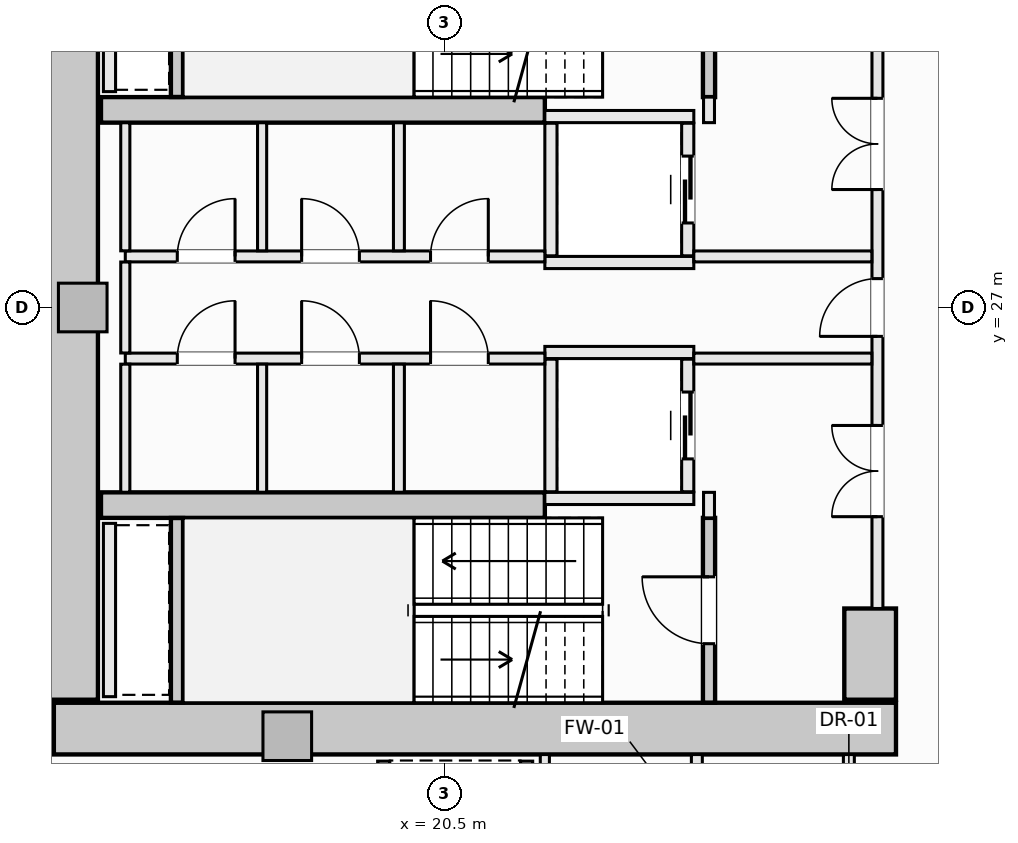
"""IFC4 building model, lengths in metres.
Left out: names, types, materials, properties, quantities, classifications, styles, units other than length and angle.
Written with IfcOpenShell. Run it as: python <this file> out.ifc"""

import sys

from ifc_helpers import new_model, si_unit, direction, frame, frame_2d, origin, origin_2d, place, context, subcontext, project, spatial, rectangle, extrude, element, fill, save


model = new_model("IFC4")
c1 = context("Model", 3, precision=1e-05, world=origin(), true_north=direction((0.0, 1.0)))
c2 = subcontext(c1, "Body", "Model", "MODEL_VIEW")
j1 = project(units=[si_unit("LENGTHUNIT", "METRE"), si_unit("PLANEANGLEUNIT", "RADIAN")], contexts=[c1])
p1 = place(None, origin())
s1 = spatial("IfcSite", under=j1, at=p1, CompositionType="ELEMENT")
p2 = place(p1, origin())
s2 = spatial("IfcBuilding", under=s1, at=p2, CompositionType="ELEMENT")
p3 = place(p2, frame((0.0, 0.0, 53.45)))
s3 = spatial("IfcBuildingStorey", under=s2, at=p3, CompositionType="ELEMENT", Elevation=53.45)
p4 = place(p3, frame((14.075, 20.075, -0.28), z_axis=(0.0, 0.0, 1.0), x_axis=(1.0, 0.0, 0.0)))
e1 = element("IfcWall", 1, at=p4, inside=s3, PredefinedType="SHEAR", context=c2, shape_type="SweptSolid", body=[
    extrude(rectangle(XDim=13.85, YDim=0.85, at=frame_2d((6.925, 0.0))), origin(), (0.0, 0.0, 1.0), 3.85),
])
p5 = place(p3, frame((14.375, 20.55, -0.28), z_axis=(0.0, 0.0, 1.0), x_axis=(0.0, 1.0, 0.0)))
e2 = element("IfcWall", 2, at=p5, inside=s3, PredefinedType="SHEAR", context=c2, shape_type="SweptSolid", body=[
    extrude(rectangle(XDim=12.9, YDim=0.85, at=frame_2d((6.45, 0.0))), origin(), (0.0, 0.0, 1.0), 3.85),
])
p6 = place(p3, frame((27.5, 20.55, -0.28), z_axis=(0.0, 0.0, 1.0), x_axis=(0.0, 1.0, 0.0)))
e3 = element("IfcWall", 3, at=p6, inside=s3, PredefinedType="SHEAR", context=c2, shape_type="SweptSolid", body=[
    extrude(rectangle(XDim=1.5, YDim=0.85, at=frame_2d((0.75, 0.0))), origin(), (0.0, 0.0, 1.0), 3.85),
])
for number, where, z_axis, x_axis in (
    (4, (14.85, 30.25, -0.28), (0.0, 0.0, 1.0), (1.0, 0.0, 0.0)),
    (5, (14.85, 23.75, -0.28), (0.0, 0.0, 1.0), (1.0, 0.0, 0.0)),
):
    element("IfcWall", number, at=place(p3, frame(where, z_axis=z_axis, x_axis=x_axis)), inside=s3, PredefinedType="SHEAR", context=c2, shape_type="SweptSolid", body=[
        extrude(rectangle(XDim=7.3, YDim=0.42, at=frame_2d((3.65, 0.0))), origin(), (0.0, 0.0, 1.0), 3.85),
    ])
for number, where, z_axis, x_axis in (
    (6, (14.55, 27.0, -0.28), (0.0, 0.0, 1.0), (1.0, 0.0, 0.0)),
    (7, (17.914, 19.95, -0.28), (0.0, 0.0, 1.0), (1.0, 0.0, 0.0)),
):
    element("IfcColumn", number, at=place(p3, frame(where, z_axis=z_axis, x_axis=x_axis)), inside=s3, PredefinedType="PILASTER", context=c2, shape_type="SweptSolid", body=[
        extrude(rectangle(XDim=0.8, YDim=0.8, at=origin_2d()), origin(), (0.0, 0.0, 1.0), 3.85),
    ])
p7 = place(p3, frame((24.85, 30.46, -0.28), z_axis=(0.0, 0.0, 1.0), x_axis=(0.0, 1.0, 0.0)))
e8 = element("IfcWall", 8, at=p7, inside=s3, PredefinedType="SHEAR", context=c2, shape_type="SweptSolid", body=[
    extrude(rectangle(XDim=3.038, YDim=0.2, at=frame_2d((1.519, 0.0))), origin(), (0.0, 0.0, 1.0), 3.85),
])
p8 = place(p7, frame((0.969, 0.0, 0.28)))
e9 = element("IfcOpeningElement", 9, at=p8, cuts=e8, PredefinedType="OPENING", context=c2, shape_type="SweptSolid", body=[
    extrude(rectangle(XDim=1.1, YDim=2.15, at=frame_2d((0.55, 1.075))), frame((0.0, 0.11, 0.0), z_axis=(0.0, -1.0, 0.0), x_axis=(1.0, 0.0, 0.0)), (0.0, 0.0, 1.0), 0.22),
])
p9 = place(p3, frame((16.1, 30.462, -0.28), z_axis=(0.0, 0.0, 1.0), x_axis=(0.0, 1.0, 0.0)))
e10 = element("IfcWall", 10, at=p9, inside=s3, PredefinedType="SHEAR", context=c2, shape_type="SweptSolid", body=[
    extrude(rectangle(XDim=3.036, YDim=0.2, at=frame_2d((1.518, 0.0))), origin(), (0.0, 0.0, 1.0), 3.85),
])
p10 = place(p3, frame((24.85, 20.502, -0.28), z_axis=(0.0, 0.0, 1.0), x_axis=(0.0, 1.0, 0.0)))
e11 = element("IfcWall", 11, at=p10, inside=s3, PredefinedType="SHEAR", context=c2, shape_type="SweptSolid", body=[
    extrude(rectangle(XDim=3.038, YDim=0.2, at=frame_2d((1.519, 0.0))), origin(), (0.0, 0.0, 1.0), 3.85),
])
p11 = place(p10, frame((0.969, 0.0, 0.28)))
e12 = element("IfcOpeningElement", 12, at=p11, cuts=e11, PredefinedType="OPENING", context=c2, shape_type="SweptSolid", body=[
    extrude(rectangle(XDim=1.1, YDim=2.15, at=frame_2d((0.55, 1.075))), frame((0.0, 0.11, 0.0), z_axis=(0.0, -1.0, 0.0), x_axis=(1.0, 0.0, 0.0)), (0.0, 0.0, 1.0), 0.22),
])
p12 = place(p3, frame((16.1, 20.502, -0.28), z_axis=(0.0, 0.0, 1.0), x_axis=(0.0, 1.0, 0.0)))
e13 = element("IfcWall", 13, at=p12, inside=s3, PredefinedType="SHEAR", context=c2, shape_type="SweptSolid", body=[
    extrude(rectangle(XDim=3.036, YDim=0.2, at=frame_2d((1.518, 0.0))), origin(), (0.0, 0.0, 1.0), 3.85),
])
for number, where, z_axis, x_axis in (
    (14, (22.15, 30.14, 0.0), (0.0, 0.0, 1.0), (1.0, 0.0, 0.0)),
    (15, (22.15, 27.74, 0.0), (0.0, 0.0, 1.0), (1.0, 0.0, 0.0)),
):
    element("IfcWall", number, at=place(p3, frame(where, z_axis=z_axis, x_axis=x_axis)), inside=s3, PredefinedType="SOLIDWALL", context=c2, shape_type="SweptSolid", body=[
        extrude(rectangle(XDim=2.45, YDim=0.2, at=frame_2d((1.225, 0.0))), origin(), (0.0, 0.0, 1.0), 3.57),
    ])
p13 = place(p3, frame((22.25, 27.85, 0.0), z_axis=(0.0, 0.0, 1.0), x_axis=(0.0, 1.0, 0.0)))
e16 = element("IfcWall", 16, at=p13, inside=s3, PredefinedType="SOLIDWALL", context=c2, shape_type="SweptSolid", body=[
    extrude(rectangle(XDim=2.18, YDim=0.2, at=frame_2d((1.09, 0.0))), origin(), (0.0, 0.0, 1.0), 3.57),
])
p14 = place(p3, frame((24.5, 27.85, 0.0), z_axis=(0.0, 0.0, 1.0), x_axis=(0.0, 1.0, 0.0)))
e17 = element("IfcWall", 17, at=p14, inside=s3, PredefinedType="SOLIDWALL", context=c2, shape_type="SweptSolid", body=[
    extrude(rectangle(XDim=2.18, YDim=0.2, at=frame_2d((1.09, 0.0))), origin(), (0.0, 0.0, 1.0), 3.57),
])
p15 = place(p14, frame((0.54, 0.0, 0.0)))
e18 = element("IfcOpeningElement", 18, at=p15, cuts=e17, PredefinedType="OPENING", context=c2, shape_type="SweptSolid", body=[
    extrude(rectangle(XDim=1.1, YDim=2.2, at=frame_2d((0.55, 1.1))), frame((0.0, 0.11, 0.0), z_axis=(0.0, -1.0, 0.0), x_axis=(1.0, 0.0, 0.0)), (0.0, 0.0, 1.0), 0.22),
])
for number, where, z_axis, x_axis in (
    (19, (22.15, 26.26, 0.0), (0.0, 0.0, 1.0), (1.0, 0.0, 0.0)),
    (20, (22.15, 23.86, 0.0), (0.0, 0.0, 1.0), (1.0, 0.0, 0.0)),
):
    element("IfcWall", number, at=place(p3, frame(where, z_axis=z_axis, x_axis=x_axis)), inside=s3, PredefinedType="SOLIDWALL", context=c2, shape_type="SweptSolid", body=[
        extrude(rectangle(XDim=2.45, YDim=0.2, at=frame_2d((1.225, 0.0))), origin(), (0.0, 0.0, 1.0), 3.57),
    ])
p16 = place(p3, frame((22.25, 23.97, 0.0), z_axis=(0.0, 0.0, 1.0), x_axis=(0.0, 1.0, 0.0)))
e21 = element("IfcWall", 21, at=p16, inside=s3, PredefinedType="SOLIDWALL", context=c2, shape_type="SweptSolid", body=[
    extrude(rectangle(XDim=2.18, YDim=0.2, at=frame_2d((1.09, 0.0))), origin(), (0.0, 0.0, 1.0), 3.57),
])
p17 = place(p3, frame((24.5, 23.97, 0.0), z_axis=(0.0, 0.0, 1.0), x_axis=(0.0, 1.0, 0.0)))
e22 = element("IfcWall", 22, at=p17, inside=s3, PredefinedType="SOLIDWALL", context=c2, shape_type="SweptSolid", body=[
    extrude(rectangle(XDim=2.18, YDim=0.2, at=frame_2d((1.09, 0.0))), origin(), (0.0, 0.0, 1.0), 3.57),
])
p18 = place(p17, frame((0.54, 0.0, 0.0)))
e23 = element("IfcOpeningElement", 23, at=p18, cuts=e22, PredefinedType="OPENING", context=c2, shape_type="SweptSolid", body=[
    extrude(rectangle(XDim=1.1, YDim=2.2, at=frame_2d((0.55, 1.1))), frame((0.0, 0.11, 0.0), z_axis=(0.0, -1.0, 0.0), x_axis=(1.0, 0.0, 0.0)), (0.0, 0.0, 1.0), 0.22),
])
for number, where, z_axis, x_axis in (
    (24, (19.5, 17.01, 0.0), (0.0, 0.0, 1.0), (0.0, 1.0, 0.0)),
    (25, (21.85, 17.01, 0.0), (0.0, 0.0, 1.0), (0.0, 1.0, 0.0)),
):
    element("IfcWall", number, at=place(p3, frame(where, z_axis=z_axis, x_axis=x_axis)), inside=s3, PredefinedType="SOLIDWALL", context=c2, shape_type="SweptSolid", body=[
        extrude(rectangle(XDim=2.53, YDim=0.2, at=frame_2d((1.265, 0.0))), origin(), (0.0, 0.0, 1.0), 3.57),
    ])
for number, where, z_axis, x_axis in (
    (26, (14.99, 30.55, 0.0), (0.0, 0.0, 1.0), (0.0, 1.0, 0.0)),
    (27, (14.99, 20.6, 0.0), (0.0, 0.0, 1.0), (0.0, 1.0, 0.0)),
):
    element("IfcWall", number, at=place(p3, frame(where, z_axis=z_axis, x_axis=x_axis)), inside=s3, PredefinedType="SOLIDWALL", context=c2, shape_type="SweptSolid", body=[
        extrude(rectangle(XDim=2.85, YDim=0.2, at=frame_2d((1.425, 0.0))), origin(), (0.0, 0.0, 1.0), 3.57),
    ])
for number, where, z_axis, x_axis in (
    (28, (24.85, 23.54, 0.0), (0.0, 0.0, 1.0), (0.0, 1.0, 0.0)),
    (29, (24.85, 30.04, 0.0), (0.0, 0.0, 1.0), (0.0, 1.0, 0.0)),
):
    element("IfcWall", number, at=place(p3, frame(where, z_axis=z_axis, x_axis=x_axis)), inside=s3, PredefinedType="SOLIDWALL", context=c2, shape_type="SweptSolid", body=[
        extrude(rectangle(XDim=0.42, YDim=0.18, at=frame_2d((0.21, 0.0))), origin(), (0.0, 0.0, 1.0), 3.57),
    ])
p19 = place(p3, frame((27.62, 22.05, 0.0), z_axis=(0.0, 0.0, 1.0), x_axis=(0.0, 1.0, 0.0)))
e30 = element("IfcWall", 30, at=p19, inside=s3, PredefinedType="SOLIDWALL", context=c2, shape_type="SweptSolid", body=[
    extrude(rectangle(XDim=9.9, YDim=0.18, at=frame_2d((4.95, 0.0))), origin(), (0.0, 0.0, 1.0), 2.662),
])
p20 = place(p19, frame((4.475, 0.0, 0.0)))
e31 = element("IfcOpeningElement", 31, at=p20, cuts=e30, PredefinedType="OPENING", context=c2, shape_type="SweptSolid", body=[
    extrude(rectangle(XDim=0.95, YDim=2.1, at=frame_2d((0.475, 1.05))), frame((0.0, 0.1, 0.0), z_axis=(0.0, -1.0, 0.0), x_axis=(1.0, 0.0, 0.0)), (0.0, 0.0, 1.0), 0.2),
])
p21 = place(p19, frame((6.89, 0.0, 0.0)))
e32 = element("IfcOpeningElement", 32, at=p21, cuts=e30, PredefinedType="OPENING", context=c2, shape_type="SweptSolid", body=[
    extrude(rectangle(XDim=1.5, YDim=2.2, at=frame_2d((0.75, 1.1))), frame((0.0, 0.1, 0.0), z_axis=(0.0, -1.0, 0.0), x_axis=(1.0, 0.0, 0.0)), (0.0, 0.0, 1.0), 0.2),
])
p22 = place(p19, frame((1.51, 0.0, 0.0)))
e33 = element("IfcOpeningElement", 33, at=p22, cuts=e30, PredefinedType="OPENING", context=c2, shape_type="SweptSolid", body=[
    extrude(rectangle(XDim=1.5, YDim=2.2, at=frame_2d((0.75, 1.1))), frame((0.0, 0.1, 0.0), z_axis=(0.0, -1.0, 0.0), x_axis=(1.0, 0.0, 0.0)), (0.0, 0.0, 1.0), 0.2),
])
p23 = place(p3, frame((15.25, 27.84, 0.0), z_axis=(0.0, 0.0, 1.0), x_axis=(1.0, 0.0, 0.0)))
e34 = element("IfcWall", 34, at=p23, inside=s3, PredefinedType="SOLIDWALL", context=c2, shape_type="SweptSolid", body=[
    extrude(rectangle(XDim=6.9, YDim=0.18, at=frame_2d((3.45, 0.0))), origin(), (0.0, 0.0, 1.0), 3.57),
])
p24 = place(p23, frame((5.02, 0.0, 0.0)))
e35 = element("IfcOpeningElement", 35, at=p24, cuts=e34, PredefinedType="OPENING", context=c2, shape_type="SweptSolid", body=[
    extrude(rectangle(XDim=0.95, YDim=2.1, at=frame_2d((0.475, 1.05))), frame((0.0, 0.1, 0.0), z_axis=(0.0, -1.0, 0.0), x_axis=(1.0, 0.0, 0.0)), (0.0, 0.0, 1.0), 0.2),
])
p25 = place(p23, frame((0.855, 0.0, 0.0)))
e36 = element("IfcOpeningElement", 36, at=p25, cuts=e34, PredefinedType="OPENING", context=c2, shape_type="SweptSolid", body=[
    extrude(rectangle(XDim=0.95, YDim=2.1, at=frame_2d((0.475, 1.05))), frame((0.0, 0.1, 0.0), z_axis=(0.0, -1.0, 0.0), x_axis=(1.0, 0.0, 0.0)), (0.0, 0.0, 1.0), 0.2),
])
p26 = place(p23, frame((2.9, 0.0, 0.0)))
e37 = element("IfcOpeningElement", 37, at=p26, cuts=e34, PredefinedType="OPENING", context=c2, shape_type="SweptSolid", body=[
    extrude(rectangle(XDim=0.95, YDim=2.1, at=frame_2d((0.475, 1.05))), frame((0.0, 0.1, 0.0), z_axis=(0.0, -1.0, 0.0), x_axis=(1.0, 0.0, 0.0)), (0.0, 0.0, 1.0), 0.2),
])
p27 = place(p3, frame((24.6, 27.84, 0.0), z_axis=(0.0, 0.0, 1.0), x_axis=(1.0, 0.0, 0.0)))
e38 = element("IfcWall", 38, at=p27, inside=s3, PredefinedType="SOLIDWALL", context=c2, shape_type="SweptSolid", body=[
    extrude(rectangle(XDim=2.928, YDim=0.18, at=frame_2d((1.464, 0.0))), origin(), (0.0, 0.0, 1.0), 3.57),
])
p28 = place(p3, frame((15.25, 26.16, 0.0), z_axis=(0.0, 0.0, 1.0), x_axis=(1.0, 0.0, 0.0)))
e39 = element("IfcWall", 39, at=p28, inside=s3, PredefinedType="SOLIDWALL", context=c2, shape_type="SweptSolid", body=[
    extrude(rectangle(XDim=6.9, YDim=0.18, at=frame_2d((3.45, 0.0))), origin(), (0.0, 0.0, 1.0), 3.57),
])
p29 = place(p28, frame((5.02, 0.0, 0.0)))
e40 = element("IfcOpeningElement", 40, at=p29, cuts=e39, PredefinedType="OPENING", context=c2, shape_type="SweptSolid", body=[
    extrude(rectangle(XDim=0.95, YDim=2.1, at=frame_2d((0.475, 1.05))), frame((0.0, 0.1, 0.0), z_axis=(0.0, -1.0, 0.0), x_axis=(1.0, 0.0, 0.0)), (0.0, 0.0, 1.0), 0.2),
])
p30 = place(p28, frame((0.855, 0.0, 0.0)))
e41 = element("IfcOpeningElement", 41, at=p30, cuts=e39, PredefinedType="OPENING", context=c2, shape_type="SweptSolid", body=[
    extrude(rectangle(XDim=0.95, YDim=2.1, at=frame_2d((0.475, 1.05))), frame((0.0, 0.1, 0.0), z_axis=(0.0, -1.0, 0.0), x_axis=(1.0, 0.0, 0.0)), (0.0, 0.0, 1.0), 0.2),
])
p31 = place(p28, frame((2.9, 0.0, 0.0)))
e42 = element("IfcOpeningElement", 42, at=p31, cuts=e39, PredefinedType="OPENING", context=c2, shape_type="SweptSolid", body=[
    extrude(rectangle(XDim=0.95, YDim=2.1, at=frame_2d((0.475, 1.05))), frame((0.0, 0.1, 0.0), z_axis=(0.0, -1.0, 0.0), x_axis=(1.0, 0.0, 0.0)), (0.0, 0.0, 1.0), 0.2),
])
p32 = place(p3, frame((24.6, 26.16, 0.0), z_axis=(0.0, 0.0, 1.0), x_axis=(1.0, 0.0, 0.0)))
e43 = element("IfcWall", 43, at=p32, inside=s3, PredefinedType="SOLIDWALL", context=c2, shape_type="SweptSolid", body=[
    extrude(rectangle(XDim=2.928, YDim=0.18, at=frame_2d((1.464, 0.0))), origin(), (0.0, 0.0, 1.0), 3.57),
])
p33 = place(p3, frame((15.25, 23.962, 0.0), z_axis=(0.0, 0.0, 1.0), x_axis=(0.0, 1.0, 0.0)))
e44 = element("IfcWall", 44, at=p33, inside=s3, PredefinedType="PARTITIONING", context=c2, shape_type="SweptSolid", body=[
    extrude(rectangle(XDim=2.106, YDim=0.15, at=frame_2d((1.053, 0.0))), origin(), (0.0, 0.0, 1.0), 3.57),
])
p34 = place(p3, frame((15.25, 26.252, 0.0), z_axis=(0.0, 0.0, 1.0), x_axis=(0.0, 1.0, 0.0)))
e45 = element("IfcWall", 45, at=p34, inside=s3, PredefinedType="PARTITIONING", context=c2, shape_type="SweptSolid", body=[
    extrude(rectangle(XDim=1.496, YDim=0.15, at=frame_2d((0.748, 0.0))), origin(), (0.0, 0.0, 1.0), 3.57),
])
p35 = place(p3, frame((15.25, 27.932, 0.0), z_axis=(0.0, 0.0, 1.0), x_axis=(0.0, 1.0, 0.0)))
e46 = element("IfcWall", 46, at=p35, inside=s3, PredefinedType="PARTITIONING", context=c2, shape_type="SweptSolid", body=[
    extrude(rectangle(XDim=2.106, YDim=0.15, at=frame_2d((1.053, 0.0))), origin(), (0.0, 0.0, 1.0), 3.57),
])
for number, where, z_axis, x_axis in (
    (47, (19.75, 23.962, 0.0), (0.0, 0.0, 1.0), (0.0, 1.0, 0.0)),
    (48, (19.75, 27.932, 0.0), (0.0, 0.0, 1.0), (0.0, 1.0, 0.0)),
):
    element("IfcWall", number, at=place(p3, frame(where, z_axis=z_axis, x_axis=x_axis)), inside=s3, PredefinedType="SOLIDWALL", context=c2, shape_type="SweptSolid", body=[
        extrude(rectangle(XDim=2.106, YDim=0.18, at=frame_2d((1.053, 0.0))), origin(), (0.0, 0.0, 1.0), 3.57),
    ])
for number, where, z_axis, x_axis in (
    (49, (17.5, 23.962, 0.0), (0.0, 0.0, 1.0), (0.0, 1.0, 0.0)),
    (50, (17.5, 27.932, 0.0), (0.0, 0.0, 1.0), (0.0, 1.0, 0.0)),
):
    element("IfcWall", number, at=place(p3, frame(where, z_axis=z_axis, x_axis=x_axis)), inside=s3, PredefinedType="PARTITIONING", context=c2, shape_type="SweptSolid", body=[
        extrude(rectangle(XDim=2.106, YDim=0.15, at=frame_2d((1.053, 0.0))), origin(), (0.0, 0.0, 1.0), 3.57),
    ])
p36 = place(p3, frame((22.15, 17.142, 0.0), z_axis=(0.0, 0.0, 1.0), x_axis=(0.0, 1.0, 0.0)))
e51 = element("IfcWall", 51, at=p36, inside=s3, PredefinedType="PARTITIONING", context=c2, shape_type="SweptSolid", body=[
    extrude(rectangle(XDim=2.506, YDim=0.15, at=frame_2d((1.253, 0.0))), origin(), (0.0, 0.0, 1.0), 3.57),
])
p37 = place(p3, frame((24.65, 17.142, 0.0), z_axis=(0.0, 0.0, 1.0), x_axis=(0.0, 1.0, 0.0)))
e52 = element("IfcWall", 52, at=p37, inside=s3, PredefinedType="SOLIDWALL", context=c2, shape_type="SweptSolid", body=[
    extrude(rectangle(XDim=2.506, YDim=0.18, at=frame_2d((1.253, 0.0))), origin(), (0.0, 0.0, 1.0), 3.57),
])
p38 = place(p37, frame((0.778, 0.0, 0.0)))
e53 = element("IfcOpeningElement", 53, at=p38, cuts=e52, PredefinedType="OPENING", context=c2, shape_type="SweptSolid", body=[
    extrude(rectangle(XDim=0.95, YDim=2.1, at=frame_2d((0.475, 1.05))), frame((0.0, 0.1, 0.0), z_axis=(0.0, -1.0, 0.0), x_axis=(1.0, 0.0, 0.0)), (0.0, 0.0, 1.0), 0.2),
])
p39 = place(p3, frame((27.15, 17.142, 0.0), z_axis=(0.0, 0.0, 1.0), x_axis=(0.0, 1.0, 0.0)))
e54 = element("IfcWall", 54, at=p39, inside=s3, PredefinedType="SOLIDWALL", context=c2, shape_type="SweptSolid", body=[
    extrude(rectangle(XDim=2.506, YDim=0.18, at=frame_2d((1.253, 0.0))), origin(), (0.0, 0.0, 1.0), 3.57),
])
p40 = place(p39, frame((0.778, 0.0, 0.0)))
e55 = element("IfcOpeningElement", 55, at=p40, cuts=e54, PredefinedType="OPENING", context=c2, shape_type="SweptSolid", body=[
    extrude(rectangle(XDim=0.95, YDim=2.1, at=frame_2d((0.475, 1.05))), frame((0.0, 0.1, 0.0), z_axis=(0.0, -1.0, 0.0), x_axis=(1.0, 0.0, 0.0)), (0.0, 0.0, 1.0), 0.2),
])
p41 = place(p11, origin())
e56 = element("IfcDoor", 56, at=p41, inside=s3, OperationType="SINGLE_SWING_RIGHT", PredefinedType="DOOR", context=c2, shape_type="SweptSolid", body=[
    extrude(rectangle(XDim=1.1, YDim=2.15, at=frame_2d((0.55, 1.075))), frame((0.0, 0.025, 0.0), z_axis=(0.0, -1.0, 0.0), x_axis=(1.0, 0.0, 0.0)), (0.0, 0.0, 1.0), 0.05),
])
fill(e12, e56)
p42 = place(p15, origin())
e57 = element("IfcDoor", 57, at=p42, inside=s3, OperationType="SLIDING_TO_LEFT", PredefinedType="DOOR", context=c2, shape_type="SweptSolid", body=[
    extrude(rectangle(XDim=1.1, YDim=2.2, at=frame_2d((0.55, 1.1))), frame((0.0, 0.025, 0.0), z_axis=(0.0, -1.0, 0.0), x_axis=(1.0, 0.0, 0.0)), (0.0, 0.0, 1.0), 0.05),
])
fill(e18, e57)
p43 = place(p18, origin())
e58 = element("IfcDoor", 58, at=p43, inside=s3, OperationType="SLIDING_TO_LEFT", PredefinedType="DOOR", context=c2, shape_type="SweptSolid", body=[
    extrude(rectangle(XDim=1.1, YDim=2.2, at=frame_2d((0.55, 1.1))), frame((0.0, 0.025, 0.0), z_axis=(0.0, -1.0, 0.0), x_axis=(1.0, 0.0, 0.0)), (0.0, 0.0, 1.0), 0.05),
])
fill(e23, e58)
p44 = place(p20, origin())
e59 = element("IfcDoor", 59, at=p44, inside=s3, OperationType="SINGLE_SWING_LEFT", PredefinedType="DOOR", context=c2, shape_type="SweptSolid", body=[
    extrude(rectangle(XDim=0.95, YDim=2.1, at=frame_2d((0.475, 1.05))), frame((0.0, 0.025, 0.0), z_axis=(0.0, -1.0, 0.0), x_axis=(1.0, 0.0, 0.0)), (0.0, 0.0, 1.0), 0.05),
])
fill(e31, e59)
p45 = place(p21, origin())
e60 = element("IfcDoor", 60, at=p45, inside=s3, OperationType="DOUBLE_DOOR_SINGLE_SWING", PredefinedType="DOOR", context=c2, shape_type="SweptSolid", body=[
    extrude(rectangle(XDim=1.5, YDim=2.2, at=frame_2d((0.75, 1.1))), frame((0.0, 0.025, 0.0), z_axis=(0.0, -1.0, 0.0), x_axis=(1.0, 0.0, 0.0)), (0.0, 0.0, 1.0), 0.05),
])
fill(e32, e60)
p46 = place(p22, origin())
e61 = element("IfcDoor", 61, at=p46, inside=s3, OperationType="DOUBLE_DOOR_SINGLE_SWING", PredefinedType="DOOR", context=c2, shape_type="SweptSolid", body=[
    extrude(rectangle(XDim=1.5, YDim=2.2, at=frame_2d((0.75, 1.1))), frame((0.0, 0.025, 0.0), z_axis=(0.0, -1.0, 0.0), x_axis=(1.0, 0.0, 0.0)), (0.0, 0.0, 1.0), 0.05),
])
fill(e33, e61)
p47 = place(p24, origin())
e62 = element("IfcDoor", 62, at=p47, inside=s3, OperationType="SINGLE_SWING_RIGHT", PredefinedType="DOOR", context=c2, shape_type="SweptSolid", body=[
    extrude(rectangle(XDim=0.95, YDim=2.1, at=frame_2d((0.475, 1.05))), frame((0.0, 0.025, 0.0), z_axis=(0.0, -1.0, 0.0), x_axis=(1.0, 0.0, 0.0)), (0.0, 0.0, 1.0), 0.05),
])
fill(e35, e62)
p48 = place(p29, origin())
e63 = element("IfcDoor", 63, at=p48, inside=s3, OperationType="SINGLE_SWING_LEFT", PredefinedType="DOOR", context=c2, shape_type="SweptSolid", body=[
    extrude(rectangle(XDim=0.95, YDim=2.1, at=frame_2d((0.475, 1.05))), frame((0.0, 0.025, 0.0), z_axis=(0.0, -1.0, 0.0), x_axis=(1.0, 0.0, 0.0)), (0.0, 0.0, 1.0), 0.05),
])
fill(e40, e63)
p49 = place(p25, origin())
e64 = element("IfcDoor", 64, at=p49, inside=s3, OperationType="SINGLE_SWING_RIGHT", PredefinedType="DOOR", context=c2, shape_type="SweptSolid", body=[
    extrude(rectangle(XDim=0.95, YDim=2.1, at=frame_2d((0.475, 1.05))), frame((0.0, 0.025, 0.0), z_axis=(0.0, -1.0, 0.0), x_axis=(1.0, 0.0, 0.0)), (0.0, 0.0, 1.0), 0.05),
])
fill(e36, e64)
p50 = place(p26, origin())
e65 = element("IfcDoor", 65, at=p50, inside=s3, OperationType="SINGLE_SWING_LEFT", PredefinedType="DOOR", context=c2, shape_type="SweptSolid", body=[
    extrude(rectangle(XDim=0.95, YDim=2.1, at=frame_2d((0.475, 1.05))), frame((0.0, 0.025, 0.0), z_axis=(0.0, -1.0, 0.0), x_axis=(1.0, 0.0, 0.0)), (0.0, 0.0, 1.0), 0.05),
])
fill(e37, e65)
p51 = place(p30, origin())
e66 = element("IfcDoor", 66, at=p51, inside=s3, OperationType="SINGLE_SWING_RIGHT", PredefinedType="DOOR", context=c2, shape_type="SweptSolid", body=[
    extrude(rectangle(XDim=0.95, YDim=2.1, at=frame_2d((0.475, 1.05))), frame((0.0, 0.025, 0.0), z_axis=(0.0, -1.0, 0.0), x_axis=(1.0, 0.0, 0.0)), (0.0, 0.0, 1.0), 0.05),
])
fill(e41, e66)
p52 = place(p31, origin())
e67 = element("IfcDoor", 67, at=p52, inside=s3, OperationType="SINGLE_SWING_LEFT", PredefinedType="DOOR", context=c2, shape_type="SweptSolid", body=[
    extrude(rectangle(XDim=0.95, YDim=2.1, at=frame_2d((0.475, 1.05))), frame((0.0, 0.025, 0.0), z_axis=(0.0, -1.0, 0.0), x_axis=(1.0, 0.0, 0.0)), (0.0, 0.0, 1.0), 0.05),
])
fill(e42, e67)
save(model, sys.argv[1])
